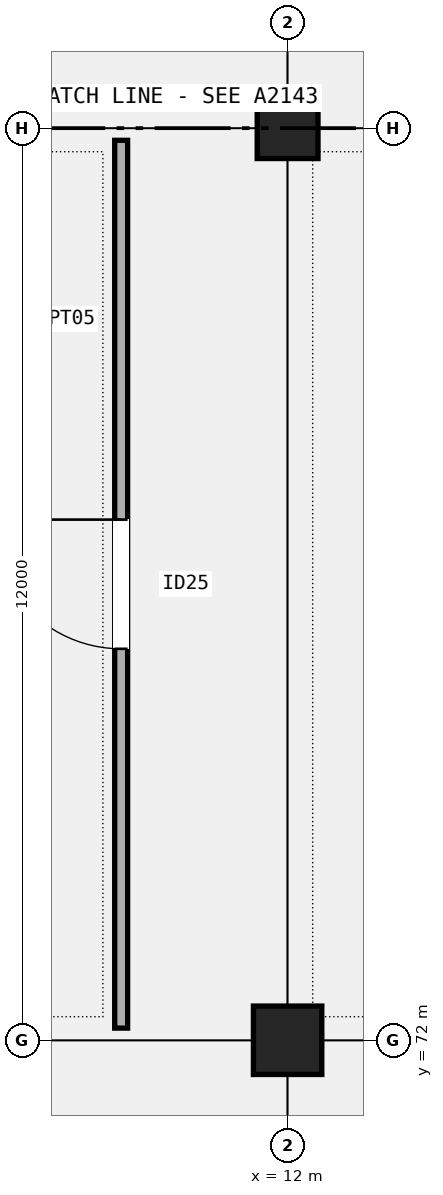
"""IFC4 building model, lengths in metres.
Left out: names, types, materials, properties, quantities, classifications, styles, units other than length and angle.
Written with IfcOpenShell. Run it as: python <this file> out.ifc"""

import sys

from ifc_helpers import new_model, si_unit, direction, frame, frame_2d, origin, origin_2d, place, context, subcontext, project, spatial, rectangle, extrude, element, fill, save


model = new_model("IFC4")
c1 = context("Model", 3, precision=1e-05, world=origin(), true_north=direction((0.0, 1.0)))
c2 = subcontext(c1, "Body", "Model", "MODEL_VIEW")
j1 = project(units=[si_unit("LENGTHUNIT", "METRE"), si_unit("PLANEANGLEUNIT", "RADIAN")], contexts=[c1])
p1 = place(None, origin())
s1 = spatial("IfcSite", under=j1, at=p1, CompositionType="ELEMENT")
p2 = place(p1, origin())
s2 = spatial("IfcBuilding", under=s1, at=p2, CompositionType="ELEMENT")
p3 = place(p2, frame((0.0, 0.0, 10.2)))
s3 = spatial("IfcBuildingStorey", under=s2, at=p3, CompositionType="ELEMENT", Elevation=10.2)
p4 = place(p3, frame((12.0, 72.0, 0.0), z_axis=(0.0, 0.0, 1.0), x_axis=(1.0, 0.0, 0.0)))
e1 = element("IfcColumn", 1, at=p4, inside=s3, PredefinedType="COLUMN", context=c2, shape_type="SweptSolid", body=[
    extrude(rectangle(XDim=0.9, YDim=0.9, at=origin_2d()), origin(), (0.0, 0.0, 1.0), 5.1),
])
p5 = place(p3, frame((12.0, 84.0, 0.0), z_axis=(0.0, 0.0, 1.0), x_axis=(1.0, 0.0, 0.0)))
e2 = element("IfcColumn", 2, at=p5, inside=s3, PredefinedType="COLUMN", context=c2, shape_type="SweptSolid", body=[
    extrude(rectangle(XDim=0.8, YDim=0.8, at=origin_2d()), origin(), (0.0, 0.0, 1.0), 5.1),
])
p6 = place(p3, frame((9.81, 72.16, 0.0), z_axis=(0.0, 0.0, 1.0), x_axis=(0.0, 1.0, 0.0)))
e3 = element("IfcWall", 3, at=p6, inside=s3, PredefinedType="PARTITIONING", context=c2, shape_type="SweptSolid", body=[
    extrude(rectangle(XDim=11.68, YDim=0.17, at=frame_2d((5.84, 0.0))), origin(), (0.0, 0.0, 1.0), 4.22),
])
p7 = place(p6, frame((4.99, 0.0, 0.0)))
e4 = element("IfcOpeningElement", 4, at=p7, cuts=e3, PredefinedType="OPENING", context=c2, shape_type="SweptSolid", body=[
    extrude(rectangle(XDim=1.7, YDim=2.32, at=frame_2d((0.85, 1.16))), frame((0.0, 0.095, 0.0), z_axis=(0.0, -1.0, 0.0), x_axis=(1.0, 0.0, 0.0)), (0.0, 0.0, 1.0), 0.19),
])
p8 = place(p7, origin())
e5 = element("IfcDoor", 5, at=p8, inside=s3, OperationType="SINGLE_SWING_RIGHT", PredefinedType="DOOR", context=c2, shape_type="SweptSolid", body=[
    extrude(rectangle(XDim=1.7, YDim=2.32, at=frame_2d((0.85, 1.16))), frame((0.0, 0.025, 0.0), z_axis=(0.0, -1.0, 0.0), x_axis=(1.0, 0.0, 0.0)), (0.0, 0.0, 1.0), 0.05),
])
fill(e4, e5)
save(model, sys.argv[1])
